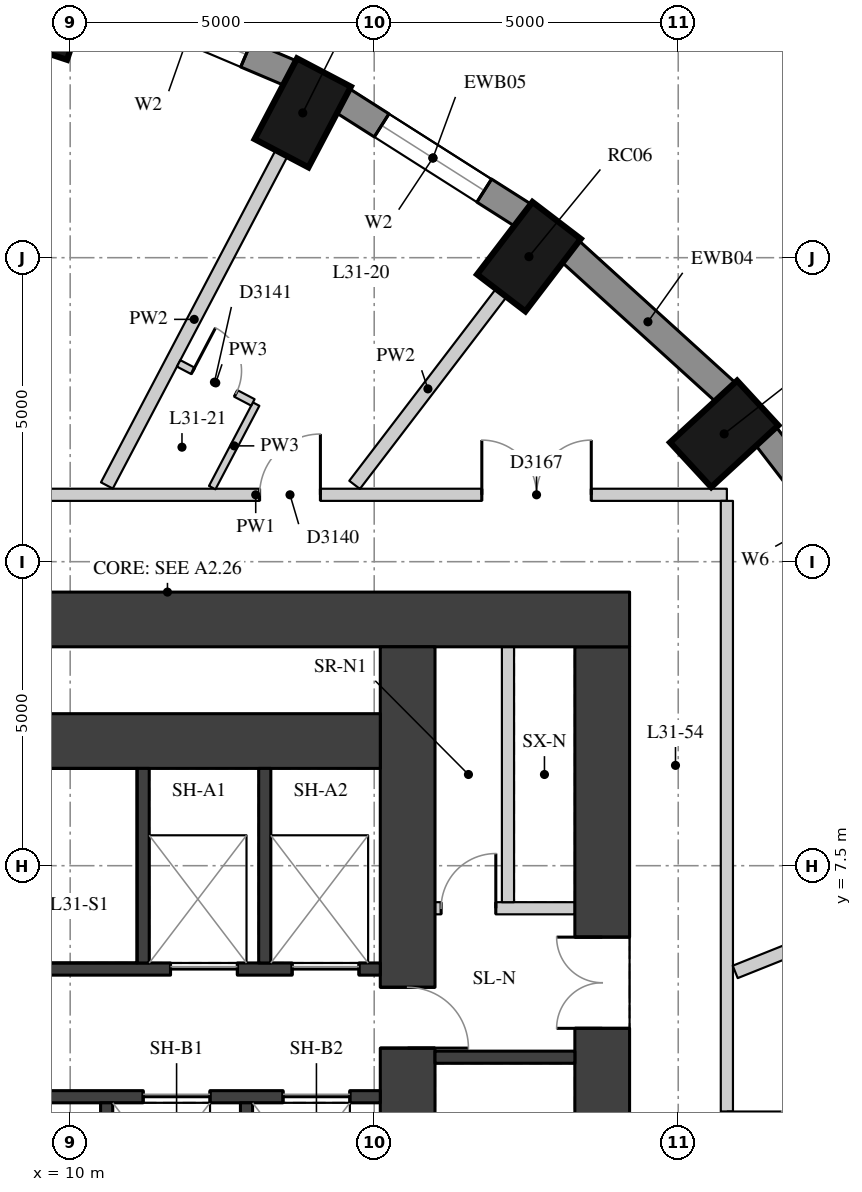
"""IFC4 building model, lengths in metres.
Left out: names, types, materials, properties, quantities, classifications, styles, units other than length and angle.
Written with IfcOpenShell. Run it as: python <this file> out.ifc"""

import sys

from ifc_helpers import new_model, si_unit, direction, frame, frame_2d, origin, origin_2d, place, context, subcontext, project, spatial, rectangle, extrude, element, fill, save


model = new_model("IFC4")
c1 = context("Model", 3, precision=1e-05, world=origin(), true_north=direction((0.0, 1.0)))
c2 = subcontext(c1, "Body", "Model", "MODEL_VIEW")
j1 = project(units=[si_unit("LENGTHUNIT", "METRE"), si_unit("PLANEANGLEUNIT", "RADIAN")], contexts=[c1])
p1 = place(None, origin())
s1 = spatial("IfcSite", under=j1, at=p1, CompositionType="ELEMENT")
p2 = place(p1, origin())
s2 = spatial("IfcBuilding", under=s1, at=p2, CompositionType="ELEMENT")
p3 = place(p2, frame((0.0, 0.0, 112.0)))
s3 = spatial("IfcBuildingStorey", under=s2, at=p3, CompositionType="ELEMENT", Elevation=112.0)
for number, where, z_axis, x_axis in (
    (1, (20.755, 14.602, 0.0), (0.0, 0.0, 1.0), (0.735, 0.678, 0.0)),
    (2, (17.545, 17.517, 0.0), (0.0, 0.0, 1.0), (0.607, 0.795, 0.0)),
    (3, (13.825, 19.882, 0.0), (0.0, 0.0, 1.0), (0.465, 0.885, 0.0)),
    (4, (9.71, 21.624, 0.0), (0.0, 0.0, 1.0), (0.315, 0.949, 0.0)),
):
    element("IfcColumn", number, at=place(p3, frame(where, z_axis=z_axis, x_axis=x_axis)), inside=s3, PredefinedType="COLUMN", context=c2, shape_type="SweptSolid", body=[
        extrude(rectangle(XDim=1.5, YDim=1.0, at=origin_2d()), origin(), (0.0, 0.0, 1.0), 3.3),
    ])
p4 = place(p3, frame((23.508, 11.887, 0.0), z_axis=(0.0, 0.0, 1.0), x_axis=(-0.610693945156, 0.791866721961, 0.0)))
e5 = element("IfcWall", 5, at=p4, inside=s3, PredefinedType="SOLIDWALL", context=c2, shape_type="SweptSolid", body=[
    extrude(rectangle(XDim=3.395, YDim=0.45, at=frame_2d((1.697, 0.0))), origin(), (0.0, 0.0, 1.0), 3.02),
])
p5 = place(p4, frame((1.397, 0.0, 0.4)))
e6 = element("IfcOpeningElement", 6, at=p5, cuts=e5, PredefinedType="OPENING", context=c2, shape_type="SweptSolid", body=[
    extrude(rectangle(XDim=0.6, YDim=1.75, at=frame_2d((0.3, 0.875))), frame((0.0, 0.235, 0.0), z_axis=(0.0, -1.0, 0.0), x_axis=(1.0, 0.0, 0.0)), (0.0, 0.0, 1.0), 0.47),
])
p6 = place(p3, frame((20.784, 15.281, 0.0), z_axis=(0.0, 0.0, 1.0), x_axis=(-0.74032902847, 0.672244694739, 0.0)))
e7 = element("IfcWall", 7, at=p6, inside=s3, PredefinedType="SOLIDWALL", context=c2, shape_type="SweptSolid", body=[
    extrude(rectangle(XDim=3.464, YDim=0.45, at=frame_2d((1.732, 0.0))), origin(), (0.0, 0.0, 1.0), 3.02),
])
p7 = place(p3, frame((17.456, 18.192, 0.0), z_axis=(0.0, 0.0, 1.0), x_axis=(-0.843880549131, 0.536531097699, 0.0)))
e8 = element("IfcWall", 8, at=p7, inside=s3, PredefinedType="SOLIDWALL", context=c2, shape_type="SweptSolid", body=[
    extrude(rectangle(XDim=3.532, YDim=0.45, at=frame_2d((1.766, 0.0))), origin(), (0.0, 0.0, 1.0), 3.02),
])
p8 = place(p7, frame((0.766, 0.0, 0.4)))
e9 = element("IfcOpeningElement", 9, at=p8, cuts=e8, PredefinedType="OPENING", context=c2, shape_type="SweptSolid", body=[
    extrude(rectangle(XDim=2.0, YDim=1.75, at=frame_2d((1.0, 0.875))), frame((0.0, 0.235, 0.0), z_axis=(0.0, -1.0, 0.0), x_axis=(1.0, 0.0, 0.0)), (0.0, 0.0, 1.0), 0.47),
])
p9 = place(p3, frame((13.625, 20.533, 0.0), z_axis=(0.0, 0.0, 1.0), x_axis=(-0.920869643542, 0.389870619055, 0.0)))
e10 = element("IfcWall", 10, at=p9, inside=s3, PredefinedType="SOLIDWALL", context=c2, shape_type="SweptSolid", body=[
    extrude(rectangle(XDim=3.591, YDim=0.45, at=frame_2d((1.796, 0.0))), origin(), (0.0, 0.0, 1.0), 3.02),
])
p10 = place(p9, frame((0.796, 0.0, 0.4)))
e11 = element("IfcOpeningElement", 11, at=p10, cuts=e10, PredefinedType="OPENING", context=c2, shape_type="SweptSolid", body=[
    extrude(rectangle(XDim=2.0, YDim=1.75, at=frame_2d((1.0, 0.875))), frame((0.0, 0.235, 0.0), z_axis=(0.0, -1.0, 0.0), x_axis=(1.0, 0.0, 0.0)), (0.0, 0.0, 1.0), 0.47),
])
p11 = place(p3, frame((18.75, -11.1, 0.0), z_axis=(0.0, 0.0, 1.0), x_axis=(0.0, 1.0, 0.0)))
e12 = element("IfcWall", 12, at=p11, inside=s3, PredefinedType="SHEAR", context=c2, shape_type="SweptSolid", body=[
    extrude(rectangle(XDim=22.2, YDim=0.9, at=frame_2d((11.1, 0.0))), origin(), (0.0, 0.0, 1.0), 3.02),
])
p12 = place(p11, frame((15.925, 0.0, 0.0)))
e13 = element("IfcOpeningElement", 13, at=p12, cuts=e12, PredefinedType="OPENING", context=c2, shape_type="SweptSolid", body=[
    extrude(rectangle(XDim=1.5, YDim=2.1, at=frame_2d((0.75, 1.05))), frame((0.0, 0.46, 0.0), z_axis=(0.0, -1.0, 0.0), x_axis=(1.0, 0.0, 0.0)), (0.0, 0.0, 1.0), 0.92),
])
p13 = place(p11, frame((4.525, 0.0, 0.0)))
e14 = element("IfcOpeningElement", 14, at=p13, cuts=e12, PredefinedType="OPENING", context=c2, shape_type="SweptSolid", body=[
    extrude(rectangle(XDim=1.5, YDim=2.1, at=frame_2d((0.75, 1.05))), frame((0.0, 0.46, 0.0), z_axis=(0.0, -1.0, 0.0), x_axis=(1.0, 0.0, 0.0)), (0.0, 0.0, 1.0), 0.92),
])
p14 = place(p3, frame((4.0, 11.55, 0.0), z_axis=(0.0, 0.0, 1.0), x_axis=(1.0, 0.0, 0.0)))
e15 = element("IfcWall", 15, at=p14, inside=s3, PredefinedType="SHEAR", context=c2, shape_type="SweptSolid", body=[
    extrude(rectangle(XDim=15.2, YDim=0.9, at=frame_2d((7.6, 0.0))), origin(), (0.0, 0.0, 1.0), 3.02),
])
p15 = place(p3, frame((15.55, -11.1, 0.0), z_axis=(0.0, 0.0, 1.0), x_axis=(0.0, 1.0, 0.0)))
e16 = element("IfcWall", 16, at=p15, inside=s3, PredefinedType="SHEAR", context=c2, shape_type="SweptSolid", body=[
    extrude(rectangle(XDim=22.2, YDim=0.9, at=frame_2d((11.1, 0.0))), origin(), (0.0, 0.0, 1.0), 3.02),
])
p16 = place(p15, frame((15.6, 0.0, 0.0)))
e17 = element("IfcOpeningElement", 17, at=p16, cuts=e16, PredefinedType="OPENING", context=c2, shape_type="SweptSolid", body=[
    extrude(rectangle(XDim=1.0, YDim=2.1, at=frame_2d((0.5, 1.05))), frame((0.0, 0.46, 0.0), z_axis=(0.0, -1.0, 0.0), x_axis=(1.0, 0.0, 0.0)), (0.0, 0.0, 1.0), 0.92),
])
p17 = place(p15, frame((5.6, 0.0, 0.0)))
e18 = element("IfcOpeningElement", 18, at=p17, cuts=e16, PredefinedType="OPENING", context=c2, shape_type="SweptSolid", body=[
    extrude(rectangle(XDim=1.0, YDim=2.1, at=frame_2d((0.5, 1.05))), frame((0.0, 0.46, 0.0), z_axis=(0.0, -1.0, 0.0), x_axis=(1.0, 0.0, 0.0)), (0.0, 0.0, 1.0), 0.92),
])
p18 = place(p3, frame((4.9, 9.55, 0.0), z_axis=(0.0, 0.0, 1.0), x_axis=(1.0, 0.0, 0.0)))
e19 = element("IfcWall", 19, at=p18, inside=s3, PredefinedType="SHEAR", context=c2, shape_type="SweptSolid", body=[
    extrude(rectangle(XDim=10.2, YDim=0.9, at=frame_2d((5.1, 0.0))), origin(), (0.0, 0.0, 1.0), 3.02),
])
p19 = place(p3, frame((4.9, 5.8, 0.0), z_axis=(0.0, 0.0, 1.0), x_axis=(1.0, 0.0, 0.0)))
e20 = element("IfcWall", 20, at=p19, inside=s3, PredefinedType="SHEAR", context=c2, shape_type="SweptSolid", body=[
    extrude(rectangle(XDim=10.2, YDim=0.2, at=frame_2d((5.1, 0.0))), origin(), (0.0, 0.0, 1.0), 3.02),
])
p20 = place(p19, frame((6.75, 0.0, 0.0)))
e21 = element("IfcOpeningElement", 21, at=p20, cuts=e20, PredefinedType="OPENING", context=c2, shape_type="SweptSolid", body=[
    extrude(rectangle(XDim=1.1, YDim=2.1, at=frame_2d((0.55, 1.05))), frame((0.0, 0.11, 0.0), z_axis=(0.0, -1.0, 0.0), x_axis=(1.0, 0.0, 0.0)), (0.0, 0.0, 1.0), 0.22),
])
p21 = place(p19, frame((8.75, 0.0, 0.0)))
e22 = element("IfcOpeningElement", 22, at=p21, cuts=e20, PredefinedType="OPENING", context=c2, shape_type="SweptSolid", body=[
    extrude(rectangle(XDim=1.1, YDim=2.1, at=frame_2d((0.55, 1.05))), frame((0.0, 0.11, 0.0), z_axis=(0.0, -1.0, 0.0), x_axis=(1.0, 0.0, 0.0)), (0.0, 0.0, 1.0), 0.22),
])
p22 = place(p3, frame((4.9, 3.7, 0.0), z_axis=(0.0, 0.0, 1.0), x_axis=(1.0, 0.0, 0.0)))
e23 = element("IfcWall", 23, at=p22, inside=s3, PredefinedType="SHEAR", context=c2, shape_type="SweptSolid", body=[
    extrude(rectangle(XDim=10.2, YDim=0.2, at=frame_2d((5.1, 0.0))), origin(), (0.0, 0.0, 1.0), 3.02),
])
p23 = place(p22, frame((6.3, 0.0, 0.0)))
e24 = element("IfcOpeningElement", 24, at=p23, cuts=e23, PredefinedType="OPENING", context=c2, shape_type="SweptSolid", body=[
    extrude(rectangle(XDim=1.1, YDim=2.1, at=frame_2d((0.55, 1.05))), frame((0.0, 0.11, 0.0), z_axis=(0.0, -1.0, 0.0), x_axis=(1.0, 0.0, 0.0)), (0.0, 0.0, 1.0), 0.22),
])
p24 = place(p22, frame((8.6, 0.0, 0.0)))
e25 = element("IfcOpeningElement", 25, at=p24, cuts=e23, PredefinedType="OPENING", context=c2, shape_type="SweptSolid", body=[
    extrude(rectangle(XDim=1.1, YDim=2.1, at=frame_2d((0.55, 1.05))), frame((0.0, 0.11, 0.0), z_axis=(0.0, -1.0, 0.0), x_axis=(1.0, 0.0, 0.0)), (0.0, 0.0, 1.0), 0.22),
])
for number, where, z_axis, x_axis in (
    (26, (11.2, 5.9, 0.0), (0.0, 0.0, 1.0), (0.0, 1.0, 0.0)),
    (27, (13.2, 5.9, 0.0), (0.0, 0.0, 1.0), (0.0, 1.0, 0.0)),
):
    element("IfcWall", number, at=place(p3, frame(where, z_axis=z_axis, x_axis=x_axis)), inside=s3, PredefinedType="SHEAR", context=c2, shape_type="SweptSolid", body=[
        extrude(rectangle(XDim=3.2, YDim=0.2, at=frame_2d((1.6, 0.0))), origin(), (0.0, 0.0, 1.0), 3.02),
    ])
for number, where, z_axis, x_axis in (
    (28, (10.6, 1.1, 0.0), (0.0, 0.0, 1.0), (0.0, 1.0, 0.0)),
    (29, (12.9, 1.1, 0.0), (0.0, 0.0, 1.0), (0.0, 1.0, 0.0)),
):
    element("IfcWall", number, at=place(p3, frame(where, z_axis=z_axis, x_axis=x_axis)), inside=s3, PredefinedType="SHEAR", context=c2, shape_type="SweptSolid", body=[
        extrude(rectangle(XDim=2.5, YDim=0.2, at=frame_2d((1.25, 0.0))), origin(), (0.0, 0.0, 1.0), 3.02),
    ])
p25 = place(p3, frame((16.0, 4.35, 0.0), z_axis=(0.0, 0.0, 1.0), x_axis=(1.0, 0.0, 0.0)))
e30 = element("IfcWall", 30, at=p25, inside=s3, PredefinedType="SHEAR", context=c2, shape_type="SweptSolid", body=[
    extrude(rectangle(XDim=2.3, YDim=0.2, at=frame_2d((1.15, 0.0))), origin(), (0.0, 0.0, 1.0), 3.02),
])
p26 = place(p3, frame((16.0, 6.8, 0.0), z_axis=(0.0, 0.0, 1.0), x_axis=(1.0, 0.0, 0.0)))
e31 = element("IfcWall", 31, at=p26, inside=s3, PredefinedType="PARTITIONING", context=c2, shape_type="SweptSolid", body=[
    extrude(rectangle(XDim=2.3, YDim=0.2, at=frame_2d((1.15, 0.0))), origin(), (0.0, 0.0, 1.0), 3.02),
])
p27 = place(p26, frame((0.1, 0.0, 0.0)))
e32 = element("IfcOpeningElement", 32, at=p27, cuts=e31, PredefinedType="OPENING", context=c2, shape_type="SweptSolid", body=[
    extrude(rectangle(XDim=0.9, YDim=2.1, at=frame_2d((0.45, 1.05))), frame((0.0, 0.11, 0.0), z_axis=(0.0, -1.0, 0.0), x_axis=(1.0, 0.0, 0.0)), (0.0, 0.0, 1.0), 0.22),
])
p28 = place(p3, frame((17.2, 6.9, 0.0), z_axis=(0.0, 0.0, 1.0), x_axis=(0.0, 1.0, 0.0)))
e33 = element("IfcWall", 33, at=p28, inside=s3, PredefinedType="PARTITIONING", context=c2, shape_type="SweptSolid", body=[
    extrude(rectangle(XDim=4.2, YDim=0.2, at=frame_2d((2.1, 0.0))), origin(), (0.0, 0.0, 1.0), 3.02),
])
p29 = place(p3, frame((5.303, 13.6, 0.0), z_axis=(0.0, 0.0, 1.0), x_axis=(1.0, 0.0, 0.0)))
e34 = element("IfcWall", 34, at=p29, inside=s3, PredefinedType="PARTITIONING", context=c2, shape_type="SweptSolid", body=[
    extrude(rectangle(XDim=15.497, YDim=0.2, at=frame_2d((7.749, 0.0))), origin(), (0.0, 0.0, 1.0), 3.02),
])
p30 = place(p29, frame((7.812, 0.0, 0.0)))
e35 = element("IfcOpeningElement", 35, at=p30, cuts=e34, PredefinedType="OPENING", context=c2, shape_type="SweptSolid", body=[
    extrude(rectangle(XDim=1.0, YDim=2.1, at=frame_2d((0.5, 1.05))), frame((0.0, 0.11, 0.0), z_axis=(0.0, -1.0, 0.0), x_axis=(1.0, 0.0, 0.0)), (0.0, 0.0, 1.0), 0.22),
])
p31 = place(p29, frame((0.957, 0.0, 0.0)))
e36 = element("IfcOpeningElement", 36, at=p31, cuts=e34, PredefinedType="OPENING", context=c2, shape_type="SweptSolid", body=[
    extrude(rectangle(XDim=1.1, YDim=2.1, at=frame_2d((0.55, 1.05))), frame((0.0, 0.11, 0.0), z_axis=(0.0, -1.0, 0.0), x_axis=(1.0, 0.0, 0.0)), (0.0, 0.0, 1.0), 0.22),
])
p32 = place(p29, frame((11.467, 0.0, 0.0)))
e37 = element("IfcOpeningElement", 37, at=p32, cuts=e34, PredefinedType="OPENING", context=c2, shape_type="SweptSolid", body=[
    extrude(rectangle(XDim=1.8, YDim=2.1, at=frame_2d((0.9, 1.05))), frame((0.0, 0.11, 0.0), z_axis=(0.0, -1.0, 0.0), x_axis=(1.0, 0.0, 0.0)), (0.0, 0.0, 1.0), 0.22),
])
p33 = place(p3, frame((20.8, 13.5, 0.0), z_axis=(0.0, 0.0, 1.0), x_axis=(0.0, -1.0, 0.0)))
e38 = element("IfcWall", 38, at=p33, inside=s3, PredefinedType="PARTITIONING", context=c2, shape_type="SweptSolid", body=[
    extrude(rectangle(XDim=27.1, YDim=0.2, at=frame_2d((13.55, 0.0))), origin(), (0.0, 0.0, 1.0), 3.02),
])
p34 = place(p33, frame((22.844, 0.0, 0.0)))
e39 = element("IfcOpeningElement", 39, at=p34, cuts=e38, PredefinedType="OPENING", context=c2, shape_type="SweptSolid", body=[
    extrude(rectangle(XDim=1.8, YDim=2.1, at=frame_2d((0.9, 1.05))), frame((0.0, 0.11, 0.0), z_axis=(0.0, -1.0, 0.0), x_axis=(1.0, 0.0, 0.0)), (0.0, 0.0, 1.0), 0.22),
])
p35 = place(p33, frame((16.35, 0.0, 0.0)))
e40 = element("IfcOpeningElement", 40, at=p35, cuts=e38, PredefinedType="OPENING", context=c2, shape_type="SweptSolid", body=[
    extrude(rectangle(XDim=1.8, YDim=2.1, at=frame_2d((0.9, 1.05))), frame((0.0, 0.11, 0.0), z_axis=(0.0, -1.0, 0.0), x_axis=(1.0, 0.0, 0.0)), (0.0, 0.0, 1.0), 0.22),
])
p36 = place(p33, frame((10.051, 0.0, 0.0)))
e41 = element("IfcOpeningElement", 41, at=p36, cuts=e38, PredefinedType="OPENING", context=c2, shape_type="SweptSolid", body=[
    extrude(rectangle(XDim=1.8, YDim=2.1, at=frame_2d((0.9, 1.05))), frame((0.0, 0.11, 0.0), z_axis=(0.0, -1.0, 0.0), x_axis=(1.0, 0.0, 0.0)), (0.0, 0.0, 1.0), 0.22),
])
p37 = place(p3, frame((24.583, 7.21, 0.0), z_axis=(0.0, 0.0, 1.0), x_axis=(-0.928528147853, -0.371262008083, 0.0)))
e42 = element("IfcWall", 42, at=p37, inside=s3, PredefinedType="PARTITIONING", context=c2, shape_type="SweptSolid", body=[
    extrude(rectangle(XDim=3.926, YDim=0.22, at=frame_2d((1.963, 0.0))), origin(), (0.0, 0.0, 1.0), 3.02),
])
p38 = place(p3, frame((17.089, 16.921, 0.0), z_axis=(0.0, 0.0, 1.0), x_axis=(-0.607055443677, -0.794659479464, 0.0)))
e43 = element("IfcWall", 43, at=p38, inside=s3, PredefinedType="PARTITIONING", context=c2, shape_type="SweptSolid", body=[
    extrude(rectangle(XDim=3.973, YDim=0.22, at=frame_2d((1.987, 0.0))), origin(), (0.0, 0.0, 1.0), 3.02),
])
p39 = place(p3, frame((13.476, 19.218, 0.0), z_axis=(0.0, 0.0, 1.0), x_axis=(-0.465345394262, -0.885129179295, 0.0)))
e44 = element("IfcWall", 44, at=p39, inside=s3, PredefinedType="PARTITIONING", context=c2, shape_type="SweptSolid", body=[
    extrude(rectangle(XDim=6.173, YDim=0.22, at=frame_2d((3.086, 0.0))), origin(), (0.0, 0.0, 1.0), 3.02),
])
p40 = place(p3, frame((12.336, 13.718, 0.0), z_axis=(0.0, 0.0, 1.0), x_axis=(0.465428746876, 0.88508535271, 0.0)))
e45 = element("IfcWall", 45, at=p40, inside=s3, PredefinedType="PARTITIONING", context=c2, shape_type="SweptSolid", body=[
    extrude(rectangle(XDim=1.552, YDim=0.12, at=frame_2d((0.776, 0.0))), origin(), (0.0, 0.0, 1.0), 3.02),
])
p41 = place(p3, frame((13.005, 15.12, 0.0), z_axis=(0.0, 0.0, 1.0), x_axis=(-0.885148383454, 0.465308864378, 0.0)))
e46 = element("IfcWall", 46, at=p41, inside=s3, PredefinedType="PARTITIONING", context=c2, shape_type="SweptSolid", body=[
    extrude(rectangle(XDim=1.38, YDim=0.12, at=frame_2d((0.69, 0.0))), origin(), (0.0, 0.0, 1.0), 3.02),
])
p42 = place(p41, frame((0.315, 0.0, 0.0)))
e47 = element("IfcOpeningElement", 47, at=p42, cuts=e46, PredefinedType="OPENING", context=c2, shape_type="SweptSolid", body=[
    extrude(rectangle(XDim=0.8, YDim=2.1, at=frame_2d((0.4, 1.05))), frame((0.0, 0.07, 0.0), z_axis=(0.0, -1.0, 0.0), x_axis=(1.0, 0.0, 0.0)), (0.0, 0.0, 1.0), 0.14),
])
p43 = place(p8, origin())
e48 = element("IfcWindow", 48, at=p43, inside=s3, PartitioningType="SINGLE_PANEL", PredefinedType="WINDOW", context=c2, shape_type="SweptSolid", body=[
    extrude(rectangle(XDim=2.0, YDim=1.75, at=frame_2d((1.0, 0.875))), frame((0.0, 0.035, 0.0), z_axis=(0.0, -1.0, 0.0), x_axis=(1.0, 0.0, 0.0)), (0.0, 0.0, 1.0), 0.06),
])
fill(e9, e48)
p44 = place(p10, origin())
e49 = element("IfcWindow", 49, at=p44, inside=s3, PartitioningType="SINGLE_PANEL", PredefinedType="WINDOW", context=c2, shape_type="SweptSolid", body=[
    extrude(rectangle(XDim=2.0, YDim=1.75, at=frame_2d((1.0, 0.875))), frame((0.0, 0.035, 0.0), z_axis=(0.0, -1.0, 0.0), x_axis=(1.0, 0.0, 0.0)), (0.0, 0.0, 1.0), 0.06),
])
fill(e11, e49)
p45 = place(p12, origin())
e50 = element("IfcDoor", 50, at=p45, inside=s3, OperationType="DOUBLE_DOOR_SINGLE_SWING", PredefinedType="DOOR", context=c2, shape_type="SweptSolid", body=[
    extrude(rectangle(XDim=1.5, YDim=2.1, at=frame_2d((0.75, 1.05))), frame((0.0, 0.025, 0.0), z_axis=(0.0, -1.0, 0.0), x_axis=(1.0, 0.0, 0.0)), (0.0, 0.0, 1.0), 0.05),
])
fill(e13, e50)
p46 = place(p20, origin())
e51 = element("IfcDoor", 51, at=p46, inside=s3, OperationType="DOUBLE_DOOR_SLIDING", PredefinedType="DOOR", context=c2, shape_type="SweptSolid", body=[
    extrude(rectangle(XDim=1.1, YDim=2.1, at=frame_2d((0.55, 1.05))), frame((0.0, 0.025, 0.0), z_axis=(0.0, -1.0, 0.0), x_axis=(1.0, 0.0, 0.0)), (0.0, 0.0, 1.0), 0.05),
])
fill(e21, e51)
p47 = place(p21, origin())
e52 = element("IfcDoor", 52, at=p47, inside=s3, OperationType="DOUBLE_DOOR_SLIDING", PredefinedType="DOOR", context=c2, shape_type="SweptSolid", body=[
    extrude(rectangle(XDim=1.1, YDim=2.1, at=frame_2d((0.55, 1.05))), frame((0.0, 0.025, 0.0), z_axis=(0.0, -1.0, 0.0), x_axis=(1.0, 0.0, 0.0)), (0.0, 0.0, 1.0), 0.05),
])
fill(e22, e52)
p48 = place(p23, origin())
e53 = element("IfcDoor", 53, at=p48, inside=s3, OperationType="DOUBLE_DOOR_SLIDING", PredefinedType="DOOR", context=c2, shape_type="SweptSolid", body=[
    extrude(rectangle(XDim=1.1, YDim=2.1, at=frame_2d((0.55, 1.05))), frame((0.0, 0.025, 0.0), z_axis=(0.0, -1.0, 0.0), x_axis=(1.0, 0.0, 0.0)), (0.0, 0.0, 1.0), 0.05),
])
fill(e24, e53)
p49 = place(p24, origin())
e54 = element("IfcDoor", 54, at=p49, inside=s3, OperationType="DOUBLE_DOOR_SLIDING", PredefinedType="DOOR", context=c2, shape_type="SweptSolid", body=[
    extrude(rectangle(XDim=1.1, YDim=2.1, at=frame_2d((0.55, 1.05))), frame((0.0, 0.025, 0.0), z_axis=(0.0, -1.0, 0.0), x_axis=(1.0, 0.0, 0.0)), (0.0, 0.0, 1.0), 0.05),
])
fill(e25, e54)
p50 = place(p16, origin())
e55 = element("IfcDoor", 55, at=p50, inside=s3, OperationType="SINGLE_SWING_RIGHT", PredefinedType="DOOR", context=c2, shape_type="SweptSolid", body=[
    extrude(rectangle(XDim=1.0, YDim=2.1, at=frame_2d((0.5, 1.05))), frame((0.0, 0.025, 0.0), z_axis=(0.0, -1.0, 0.0), x_axis=(1.0, 0.0, 0.0)), (0.0, 0.0, 1.0), 0.05),
])
fill(e17, e55)
p51 = place(p27, origin())
e56 = element("IfcDoor", 56, at=p51, inside=s3, OperationType="SINGLE_SWING_RIGHT", PredefinedType="DOOR", context=c2, shape_type="SweptSolid", body=[
    extrude(rectangle(XDim=0.9, YDim=2.1, at=frame_2d((0.45, 1.05))), frame((0.0, 0.025, 0.0), z_axis=(0.0, -1.0, 0.0), x_axis=(1.0, 0.0, 0.0)), (0.0, 0.0, 1.0), 0.05),
])
fill(e32, e56)
p52 = place(p30, origin())
e57 = element("IfcDoor", 57, at=p52, inside=s3, OperationType="SINGLE_SWING_RIGHT", PredefinedType="DOOR", context=c2, shape_type="SweptSolid", body=[
    extrude(rectangle(XDim=1.0, YDim=2.1, at=frame_2d((0.5, 1.05))), frame((0.0, 0.025, 0.0), z_axis=(0.0, -1.0, 0.0), x_axis=(1.0, 0.0, 0.0)), (0.0, 0.0, 1.0), 0.05),
])
fill(e35, e57)
p53 = place(p42, origin())
e58 = element("IfcDoor", 58, at=p53, inside=s3, OperationType="SINGLE_SWING_LEFT", PredefinedType="DOOR", context=c2, shape_type="SweptSolid", body=[
    extrude(rectangle(XDim=0.8, YDim=2.1, at=frame_2d((0.4, 1.05))), frame((0.0, 0.025, 0.0), z_axis=(0.0, -1.0, 0.0), x_axis=(1.0, 0.0, 0.0)), (0.0, 0.0, 1.0), 0.05),
])
fill(e47, e58)
p54 = place(p32, origin())
e59 = element("IfcDoor", 59, at=p54, inside=s3, OperationType="DOUBLE_DOOR_SINGLE_SWING", PredefinedType="DOOR", context=c2, shape_type="SweptSolid", body=[
    extrude(rectangle(XDim=1.8, YDim=2.1, at=frame_2d((0.9, 1.05))), frame((0.0, 0.025, 0.0), z_axis=(0.0, -1.0, 0.0), x_axis=(1.0, 0.0, 0.0)), (0.0, 0.0, 1.0), 0.05),
])
fill(e37, e59)
save(model, sys.argv[1])
